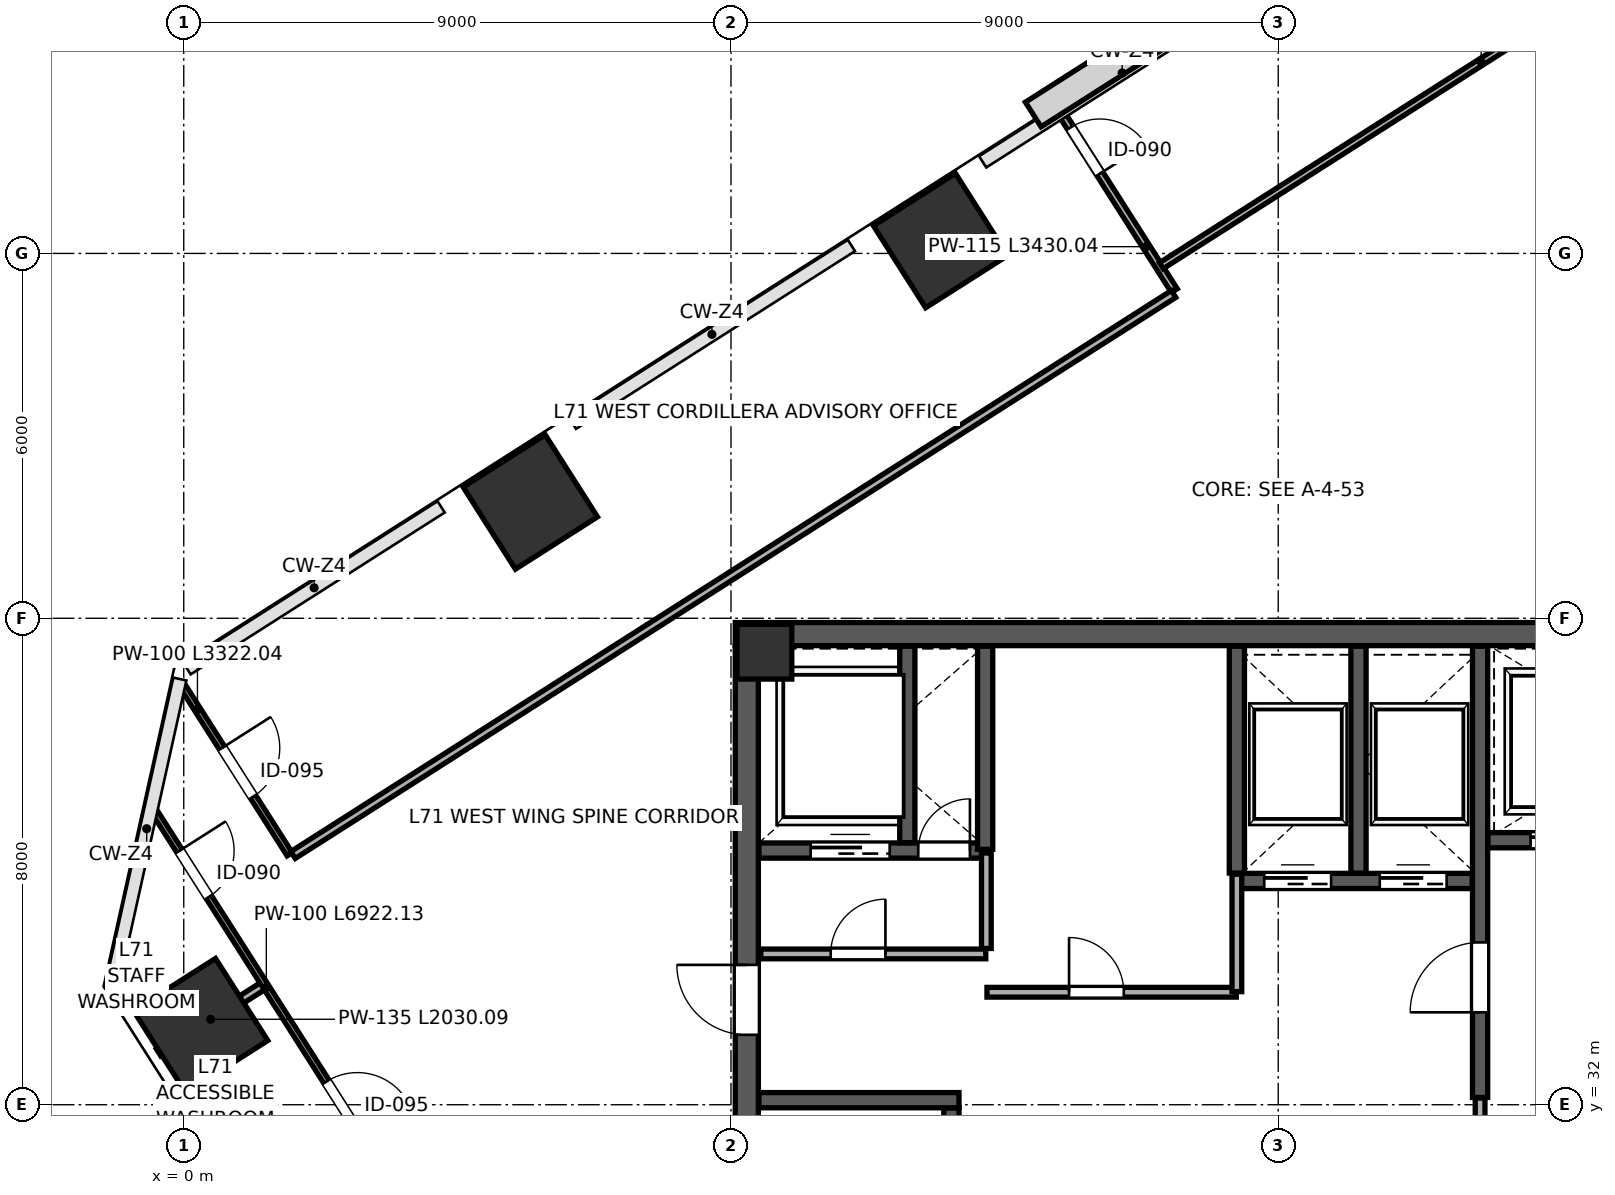
"""IFC4 building model, lengths in metres.
Left out: names, types, materials, properties, quantities, classifications, styles, units other than length and angle.
Written with IfcOpenShell. Run it as: python <this file> out.ifc"""

import sys

from ifc_helpers import new_model, si_unit, direction, frame, frame_2d, origin, origin_2d, place, context, subcontext, project, spatial, rectangle, extrude, source, transform, mapped, element, fill, save


model = new_model("IFC4")
c1 = context("Model", 3, precision=1e-05, world=origin(), true_north=direction((0.0, 1.0)))
c2 = subcontext(c1, "Body", "Model", "MODEL_VIEW")
j1 = project(units=[si_unit("LENGTHUNIT", "METRE"), si_unit("PLANEANGLEUNIT", "RADIAN")], contexts=[c1])
p1 = place(None, origin())
s1 = spatial("IfcSite", under=j1, at=p1, CompositionType="ELEMENT")
p2 = place(p1, origin())
s2 = spatial("IfcBuilding", under=s1, at=p2, CompositionType="ELEMENT")
p3 = place(p2, frame((0.0, 0.0, 315.6)))
s3 = spatial("IfcBuildingStorey", under=s2, at=p3, CompositionType="ELEMENT", Elevation=315.6)
m1 = source(origin(), c2, "Body", "SweptSolid", [
    extrude(rectangle(XDim=0.9, YDim=0.9, at=origin_2d()), origin(), (0.0, 0.0, 1.0), 4.198),
])
p4 = place(p3, frame((9.55, 39.45, 0.001), z_axis=(0.0, 0.0, 1.0), x_axis=(1.0, 0.0, 0.0)))
e1 = element("IfcColumn", 1, at=p4, inside=s3, PredefinedType="COLUMN", context=c2, shape_type="MappedRepresentation", body=[
    mapped(m1, transform((0.0, 0.0, 0.0), scale=1.0)),
])
m2 = source(origin(), c2, "Body", "SweptSolid", [
    extrude(rectangle(XDim=1.6, YDim=1.6, at=origin_2d()), origin(), (0.0, 0.0, 1.0), 4.198),
])
for number, where, z_axis, x_axis in (
    (2, (0.277, 33.301, 0.001), (0.0, 0.0, 1.0), (-0.537, 0.843, 0.0)),
    (3, (5.699, 41.913, 0.001), (0.0, 0.0, 1.0), (-0.537, 0.843, 0.0)),
    (4, (12.447, 46.211, 0.001), (0.0, 0.0, 1.0), (-0.537, 0.843, 0.0)),
):
    element("IfcColumn", number, at=place(p3, frame(where, z_axis=z_axis, x_axis=x_axis)), inside=s3, PredefinedType="COLUMN", context=c2, shape_type="MappedRepresentation", body=[
        mapped(m2, transform((0.0, 0.0, 0.0), scale=1.0)),
    ])
p5 = place(p3, frame((9.26, 24.45, 0.0), z_axis=(0.0, 0.0, 1.0), x_axis=(0.0, 1.0, 0.0)))
e5 = element("IfcWall", 5, at=p5, inside=s3, PredefinedType="SHEAR", context=c2, shape_type="SweptSolid", body=[
    extrude(rectangle(XDim=15.1, YDim=0.38, at=frame_2d((7.55, 0.0))), origin(), (0.0, 0.0, 1.0), 3.96),
])
p6 = place(p5, frame((8.7, 0.0, 0.0)))
e6 = element("IfcOpeningElement", 6, at=p6, cuts=e5, PredefinedType="OPENING", context=c2, shape_type="SweptSolid", body=[
    extrude(rectangle(XDim=1.15, YDim=2.2, at=frame_2d((0.575, 1.1))), frame((0.0, 0.2, 0.0), z_axis=(0.0, -1.0, 0.0), x_axis=(1.0, 0.0, 0.0)), (0.0, 0.0, 1.0), 0.4),
])
p7 = place(p3, frame((9.07, 39.74, 0.0), z_axis=(0.0, 0.0, 1.0), x_axis=(1.0, 0.0, 0.0)))
e7 = element("IfcWall", 7, at=p7, inside=s3, PredefinedType="SHEAR", context=c2, shape_type="SweptSolid", body=[
    extrude(rectangle(XDim=17.86, YDim=0.38, at=frame_2d((8.93, 0.0))), origin(), (0.0, 0.0, 1.0), 3.96),
])
p8 = place(p3, frame((12.625, 24.46, 0.0), z_axis=(0.0, 0.0, 1.0), x_axis=(0.0, 1.0, 0.0)))
e8 = element("IfcWall", 8, at=p8, inside=s3, PredefinedType="SHEAR", context=c2, shape_type="SweptSolid", body=[
    extrude(rectangle(XDim=7.49, YDim=0.25, at=frame_2d((3.745, 0.0))), origin(), (0.0, 0.0, 1.0), 3.96),
])
p9 = place(p8, frame((5.85, 0.0, 0.0)))
e9 = element("IfcOpeningElement", 9, at=p9, cuts=e8, PredefinedType="OPENING", context=c2, shape_type="SweptSolid", body=[
    extrude(rectangle(XDim=1.15, YDim=2.2, at=frame_2d((0.575, 1.1))), frame((0.0, 0.135, 0.0), z_axis=(0.0, -1.0, 0.0), x_axis=(1.0, 0.0, 0.0)), (0.0, 0.0, 1.0), 0.27),
])
p10 = place(p3, frame((9.46, 32.075, 0.0), z_axis=(0.0, 0.0, 1.0), x_axis=(1.0, 0.0, 0.0)))
e10 = element("IfcWall", 10, at=p10, inside=s3, PredefinedType="SHEAR", context=c2, shape_type="SweptSolid", body=[
    extrude(rectangle(XDim=3.29, YDim=0.25, at=frame_2d((1.645, 0.0))), origin(), (0.0, 0.0, 1.0), 3.96),
])
p11 = place(p3, frame((21.32, 32.12, 0.0), z_axis=(0.0, 0.0, 1.0), x_axis=(0.0, 1.0, 0.0)))
e11 = element("IfcWall", 11, at=p11, inside=s3, PredefinedType="SHEAR", context=c2, shape_type="SweptSolid", body=[
    extrude(rectangle(XDim=7.42, YDim=0.25, at=frame_2d((3.71, 0.0))), origin(), (0.0, 0.0, 1.0), 3.96),
])
p12 = place(p11, frame((1.4, 0.0, 0.0)))
e12 = element("IfcOpeningElement", 12, at=p12, cuts=e11, PredefinedType="OPENING", context=c2, shape_type="SweptSolid", body=[
    extrude(rectangle(XDim=1.15, YDim=2.2, at=frame_2d((0.575, 1.1))), frame((0.0, 0.135, 0.0), z_axis=(0.0, -1.0, 0.0), x_axis=(1.0, 0.0, 0.0)), (0.0, 0.0, 1.0), 0.27),
])
p13 = place(p3, frame((9.46, 36.18, 0.0), z_axis=(0.0, 0.0, 1.0), x_axis=(1.0, 0.0, 0.0)))
e13 = element("IfcWall", 13, at=p13, inside=s3, PredefinedType="SHEAR", context=c2, shape_type="SweptSolid", body=[
    extrude(rectangle(XDim=3.79, YDim=0.25, at=frame_2d((1.895, 0.0))), origin(), (0.0, 0.0, 1.0), 3.96),
])
p14 = place(p13, frame((2.62, 0.0, 0.0)))
e14 = element("IfcOpeningElement", 14, at=p14, cuts=e13, PredefinedType="OPENING", context=c2, shape_type="SweptSolid", body=[
    extrude(rectangle(XDim=0.85, YDim=2.1, at=frame_2d((0.425, 1.05))), frame((0.0, 0.135, 0.0), z_axis=(0.0, -1.0, 0.0), x_axis=(1.0, 0.0, 0.0)), (0.0, 0.0, 1.0), 0.27),
])
p15 = place(p13, frame((0.85, 0.0, 0.0)))
e15 = element("IfcOpeningElement", 15, at=p15, cuts=e13, PredefinedType="OPENING", context=c2, shape_type="SweptSolid", body=[
    extrude(rectangle(XDim=1.3, YDim=2.25, at=frame_2d((0.65, 1.125))), frame((0.0, 0.135, 0.0), z_axis=(0.0, -1.0, 0.0), x_axis=(1.0, 0.0, 0.0)), (0.0, 0.0, 1.0), 0.27),
])
p16 = place(p3, frame((11.9, 36.31, 0.0), z_axis=(0.0, 0.0, 1.0), x_axis=(0.0, 1.0, 0.0)))
e16 = element("IfcWall", 16, at=p16, inside=s3, PredefinedType="SHEAR", context=c2, shape_type="SweptSolid", body=[
    extrude(rectangle(XDim=3.23, YDim=0.25, at=frame_2d((1.615, 0.0))), origin(), (0.0, 0.0, 1.0), 3.96),
])
p17 = place(p3, frame((21.45, 36.35, 0.0), z_axis=(0.0, 0.0, 1.0), x_axis=(1.0, 0.0, 0.0)))
e17 = element("IfcWall", 17, at=p17, inside=s3, PredefinedType="SHEAR", context=c2, shape_type="SweptSolid", body=[
    extrude(rectangle(XDim=5.09, YDim=0.25, at=frame_2d((2.545, 0.0))), origin(), (0.0, 0.0, 1.0), 3.96),
])
p18 = place(p17, frame((0.7, 0.0, 0.0)))
e18 = element("IfcOpeningElement", 18, at=p18, cuts=e17, PredefinedType="OPENING", context=c2, shape_type="SweptSolid", body=[
    extrude(rectangle(XDim=1.2, YDim=2.2, at=frame_2d((0.6, 1.1))), frame((0.0, 0.135, 0.0), z_axis=(0.0, -1.0, 0.0), x_axis=(1.0, 0.0, 0.0)), (0.0, 0.0, 1.0), 0.27),
])
p19 = place(p17, frame((3.25, 0.0, 0.0)))
e19 = element("IfcOpeningElement", 19, at=p19, cuts=e17, PredefinedType="OPENING", context=c2, shape_type="SweptSolid", body=[
    extrude(rectangle(XDim=1.2, YDim=2.2, at=frame_2d((0.6, 1.1))), frame((0.0, 0.135, 0.0), z_axis=(0.0, -1.0, 0.0), x_axis=(1.0, 0.0, 0.0)), (0.0, 0.0, 1.0), 0.27),
])
p20 = place(p3, frame((13.18, 36.2, 0.0), z_axis=(0.0, 0.0, 1.0), x_axis=(0.0, 1.0, 0.0)))
e20 = element("IfcWall", 20, at=p20, inside=s3, PredefinedType="SHEAR", context=c2, shape_type="SweptSolid", body=[
    extrude(rectangle(XDim=3.34, YDim=0.25, at=frame_2d((1.67, 0.0))), origin(), (0.0, 0.0, 1.0), 3.96),
])
p21 = place(p3, frame((17.32, 35.68, 0.0), z_axis=(0.0, 0.0, 1.0), x_axis=(1.0, 0.0, 0.0)))
e21 = element("IfcWall", 21, at=p21, inside=s3, PredefinedType="SHEAR", context=c2, shape_type="SweptSolid", body=[
    extrude(rectangle(XDim=3.87, YDim=0.25, at=frame_2d((1.935, 0.0))), origin(), (0.0, 0.0, 1.0), 3.96),
])
p22 = place(p21, frame((0.45, 0.0, 0.0)))
e22 = element("IfcOpeningElement", 22, at=p22, cuts=e21, PredefinedType="OPENING", context=c2, shape_type="SweptSolid", body=[
    extrude(rectangle(XDim=1.1, YDim=2.2, at=frame_2d((0.55, 1.1))), frame((0.0, 0.135, 0.0), z_axis=(0.0, -1.0, 0.0), x_axis=(1.0, 0.0, 0.0)), (0.0, 0.0, 1.0), 0.27),
])
p23 = place(p21, frame((2.35, 0.0, 0.0)))
e23 = element("IfcOpeningElement", 23, at=p23, cuts=e21, PredefinedType="OPENING", context=c2, shape_type="SweptSolid", body=[
    extrude(rectangle(XDim=1.1, YDim=2.2, at=frame_2d((0.55, 1.1))), frame((0.0, 0.135, 0.0), z_axis=(0.0, -1.0, 0.0), x_axis=(1.0, 0.0, 0.0)), (0.0, 0.0, 1.0), 0.27),
])
for number, where, z_axis, x_axis in (
    (24, (17.32, 35.81, 0.0), (0.0, 0.0, 1.0), (0.0, 1.0, 0.0)),
    (25, (19.32, 35.81, 0.0), (0.0, 0.0, 1.0), (0.0, 1.0, 0.0)),
):
    element("IfcWall", number, at=place(p3, frame(where, z_axis=z_axis, x_axis=x_axis)), inside=s3, PredefinedType="SHEAR", context=c2, shape_type="SweptSolid", body=[
        extrude(rectangle(XDim=3.73, YDim=0.25, at=frame_2d((1.865, 0.0))), origin(), (0.0, 0.0, 1.0), 3.96),
    ])
p24 = place(p3, frame((9.49, 34.48, 0.0), z_axis=(0.0, 0.0, 1.0), x_axis=(1.0, 0.0, 0.0)))
e26 = element("IfcWall", 26, at=p24, inside=s3, PredefinedType="PARTITIONING", context=c2, shape_type="SweptSolid", body=[
    extrude(rectangle(XDim=3.7, YDim=0.16, at=frame_2d((1.85, 0.0))), origin(), (0.0, 0.0, 1.0), 3.96),
])
p25 = place(p24, frame((1.15, 0.0, 0.0)))
e27 = element("IfcOpeningElement", 27, at=p25, cuts=e26, PredefinedType="OPENING", context=c2, shape_type="SweptSolid", body=[
    extrude(rectangle(XDim=0.9, YDim=2.15, at=frame_2d((0.45, 1.075))), frame((0.0, 0.09, 0.0), z_axis=(0.0, -1.0, 0.0), x_axis=(1.0, 0.0, 0.0)), (0.0, 0.0, 1.0), 0.18),
])
p26 = place(p3, frame((13.2, 34.57, 0.0), z_axis=(0.0, 0.0, 1.0), x_axis=(0.0, 1.0, 0.0)))
e28 = element("IfcWall", 28, at=p26, inside=s3, PredefinedType="PARTITIONING", context=c2, shape_type="SweptSolid", body=[
    extrude(rectangle(XDim=1.57, YDim=0.16, at=frame_2d((0.785, 0.0))), origin(), (0.0, 0.0, 1.0), 3.96),
])
p27 = place(p3, frame((13.21, 33.85, 0.0), z_axis=(0.0, 0.0, 1.0), x_axis=(1.0, 0.0, 0.0)))
e29 = element("IfcWall", 29, at=p27, inside=s3, PredefinedType="PARTITIONING", context=c2, shape_type="SweptSolid", body=[
    extrude(rectangle(XDim=4.1, YDim=0.16, at=frame_2d((2.05, 0.0))), origin(), (0.0, 0.0, 1.0), 3.96),
])
p28 = place(p27, frame((1.35, 0.0, 0.0)))
e30 = element("IfcOpeningElement", 30, at=p28, cuts=e29, PredefinedType="OPENING", context=c2, shape_type="SweptSolid", body=[
    extrude(rectangle(XDim=0.9, YDim=2.15, at=frame_2d((0.45, 1.075))), frame((0.0, 0.09, 0.0), z_axis=(0.0, -1.0, 0.0), x_axis=(1.0, 0.0, 0.0)), (0.0, 0.0, 1.0), 0.18),
])
p29 = place(p3, frame((17.32, 33.86, 0.0), z_axis=(0.0, 0.0, 1.0), x_axis=(0.0, 1.0, 0.0)))
e31 = element("IfcWall", 31, at=p29, inside=s3, PredefinedType="PARTITIONING", context=c2, shape_type="SweptSolid", body=[
    extrude(rectangle(XDim=1.93, YDim=0.16, at=frame_2d((0.965, 0.0))), origin(), (0.0, 0.0, 1.0), 3.96),
])
p30 = place(p3, frame((21.32, 29.19, 0.0), z_axis=(0.0, 0.0, 1.0), x_axis=(0.0, 1.0, 0.0)))
e32 = element("IfcWall", 32, at=p30, inside=s3, PredefinedType="PARTITIONING", context=c2, shape_type="SweptSolid", body=[
    extrude(rectangle(XDim=2.92, YDim=0.16, at=frame_2d((1.46, 0.0))), origin(), (0.0, 0.0, 1.0), 3.96),
])
p31 = place(p3, frame((-0.414, 32.86, 0.0), z_axis=(0.0, 0.0, 1.0), x_axis=(0.843468317829, 0.5371789244, 0.0)))
e33 = element("IfcWall", 33, at=p31, inside=s3, PredefinedType="PARTITIONING", context=c2, shape_type="SweptSolid", body=[
    extrude(rectangle(XDim=2.03, YDim=0.135, at=frame_2d((1.015, 0.0))), origin(), (0.0, 0.0, 1.0), 3.295),
])
p32 = place(p3, frame((-0.502, 36.85, 0.0), z_axis=(0.0, 0.0, 1.0), x_axis=(0.537309039539, -0.843385437407, 0.0)))
e34 = element("IfcWall", 34, at=p32, inside=s3, PredefinedType="PARTITIONING", context=c2, shape_type="SweptSolid", body=[
    extrude(rectangle(XDim=6.922, YDim=0.1, at=frame_2d((3.461, 0.0))), origin(), (0.0, 0.0, 1.0), 3.96),
])
p33 = place(p32, frame((0.8, 0.0, 0.0)))
e35 = element("IfcOpeningElement", 35, at=p33, cuts=e34, PredefinedType="OPENING", context=c2, shape_type="SweptSolid", body=[
    extrude(rectangle(XDim=0.9, YDim=2.15, at=frame_2d((0.45, 1.075))), frame((0.0, 0.06, 0.0), z_axis=(0.0, -1.0, 0.0), x_axis=(1.0, 0.0, 0.0)), (0.0, 0.0, 1.0), 0.12),
])
p34 = place(p32, frame((5.3, 0.0, 0.0)))
e36 = element("IfcOpeningElement", 36, at=p34, cuts=e34, PredefinedType="OPENING", context=c2, shape_type="SweptSolid", body=[
    extrude(rectangle(XDim=0.95, YDim=2.15, at=frame_2d((0.475, 1.075))), frame((0.0, 0.06, 0.0), z_axis=(0.0, -1.0, 0.0), x_axis=(1.0, 0.0, 0.0)), (0.0, 0.0, 1.0), 0.12),
])
p35 = place(p3, frame((14.448, 48.281, 0.0), z_axis=(0.0, 0.0, 1.0), x_axis=(0.537285301829, -0.843400559899, 0.0)))
e37 = element("IfcWall", 37, at=p35, inside=s3, PredefinedType="PARTITIONING", context=c2, shape_type="SweptSolid", body=[
    extrude(rectangle(XDim=3.43, YDim=0.115, at=frame_2d((1.715, 0.0))), origin(), (0.0, 0.0, 1.0), 3.295),
])
p36 = place(p35, frame((0.25, 0.0, 0.0)))
e38 = element("IfcOpeningElement", 38, at=p36, cuts=e37, PredefinedType="OPENING", context=c2, shape_type="SweptSolid", body=[
    extrude(rectangle(XDim=0.9, YDim=2.15, at=frame_2d((0.45, 1.075))), frame((0.0, 0.067, 0.0), z_axis=(0.0, -1.0, 0.0), x_axis=(1.0, 0.0, 0.0)), (0.0, 0.0, 1.0), 0.135),
])
p37 = place(p3, frame((-0.042, 38.921, 0.0), z_axis=(0.0, 0.0, 1.0), x_axis=(0.537298651026, -0.843392055693, 0.0)))
e39 = element("IfcWall", 39, at=p37, inside=s3, PredefinedType="PARTITIONING", context=c2, shape_type="SweptSolid", body=[
    extrude(rectangle(XDim=3.322, YDim=0.1, at=frame_2d((1.661, 0.0))), origin(), (0.0, 0.0, 1.0), 3.96),
])
p38 = place(p37, frame((1.25, 0.0, 0.0)))
e40 = element("IfcOpeningElement", 40, at=p38, cuts=e39, PredefinedType="OPENING", context=c2, shape_type="SweptSolid", body=[
    extrude(rectangle(XDim=0.95, YDim=2.15, at=frame_2d((0.475, 1.075))), frame((0.0, 0.06, 0.0), z_axis=(0.0, -1.0, 0.0), x_axis=(1.0, 0.0, 0.0)), (0.0, 0.0, 1.0), 0.12),
])
p39 = place(p3, frame((1.798, 36.107, 0.0), z_axis=(0.0, 0.0, 1.0), x_axis=(0.843396745572, 0.537291289301, 0.0)))
e41 = element("IfcWall", 41, at=p39, inside=s3, PredefinedType="PARTITIONING", context=c2, shape_type="SweptSolid", body=[
    extrude(rectangle(XDim=17.17, YDim=0.135, at=frame_2d((8.585, 0.0))), origin(), (0.0, 0.0, 1.0), 3.96),
])
p40 = place(p3, frame((16.077, 45.797, 0.0), z_axis=(0.0, 0.0, 1.0), x_axis=(0.843392973199, 0.537297210824, 0.0)))
e42 = element("IfcWall", 42, at=p40, inside=s3, PredefinedType="PARTITIONING", context=c2, shape_type="SweptSolid", body=[
    extrude(rectangle(XDim=12.472, YDim=0.115, at=frame_2d((6.236, 0.0))), origin(), (0.0, 0.0, 1.0), 3.96),
])
m3 = source(origin(), c2, "Body", "SweptSolid", [
    extrude(rectangle(XDim=1.15, YDim=2.2, at=frame_2d((0.575, 1.1))), frame((0.0, 0.025, 0.0), z_axis=(0.0, -1.0, 0.0), x_axis=(1.0, 0.0, 0.0)), (0.0, 0.0, 1.0), 0.05),
])
p41 = place(p12, origin())
e43 = element("IfcDoor", 43, at=p41, inside=s3, OperationType="SINGLE_SWING_LEFT", PredefinedType="DOOR", context=c2, shape_type="MappedRepresentation", body=[
    mapped(m3, transform((0.0, 0.0, 0.0), scale=1.0)),
])
fill(e12, e43)
p42 = place(p6, origin())
e44 = element("IfcDoor", 44, at=p42, inside=s3, OperationType="SINGLE_SWING_RIGHT", PredefinedType="DOOR", context=c2, shape_type="MappedRepresentation", body=[
    mapped(m3, transform((0.0, 0.0, 0.0), scale=1.0)),
])
fill(e6, e44)
m4 = source(origin(), c2, "Body", "SweptSolid", [
    extrude(rectangle(XDim=0.85, YDim=2.1, at=frame_2d((0.425, 1.05))), frame((0.0, 0.025, 0.0), z_axis=(0.0, -1.0, 0.0), x_axis=(1.0, 0.0, 0.0)), (0.0, 0.0, 1.0), 0.05),
])
p43 = place(p14, origin())
e45 = element("IfcDoor", 45, at=p43, inside=s3, OperationType="SINGLE_SWING_RIGHT", PredefinedType="DOOR", context=c2, shape_type="MappedRepresentation", body=[
    mapped(m4, transform((0.0, 0.0, 0.0), scale=1.0)),
])
fill(e14, e45)
m5 = source(origin(), c2, "Body", "SweptSolid", [
    extrude(rectangle(XDim=1.1, YDim=2.2, at=frame_2d((0.55, 1.1))), frame((0.0, 0.025, 0.0), z_axis=(0.0, -1.0, 0.0), x_axis=(1.0, 0.0, 0.0)), (0.0, 0.0, 1.0), 0.05),
])
p44 = place(p22, origin())
e46 = element("IfcDoor", 46, at=p44, inside=s3, OperationType="SLIDING_TO_LEFT", PredefinedType="DOOR", context=c2, shape_type="MappedRepresentation", body=[
    mapped(m5, transform((0.0, 0.0, 0.0), scale=1.0)),
])
fill(e22, e46)
p45 = place(p23, origin())
e47 = element("IfcDoor", 47, at=p45, inside=s3, OperationType="SLIDING_TO_RIGHT", PredefinedType="DOOR", context=c2, shape_type="MappedRepresentation", body=[
    mapped(m5, transform((0.0, 0.0, 0.0), scale=1.0)),
])
fill(e23, e47)
m6 = source(origin(), c2, "Body", "SweptSolid", [
    extrude(rectangle(XDim=1.2, YDim=2.2, at=frame_2d((0.6, 1.1))), frame((0.0, 0.025, 0.0), z_axis=(0.0, -1.0, 0.0), x_axis=(1.0, 0.0, 0.0)), (0.0, 0.0, 1.0), 0.05),
])
p46 = place(p18, origin())
e48 = element("IfcDoor", 48, at=p46, inside=s3, OperationType="SLIDING_TO_LEFT", PredefinedType="DOOR", context=c2, shape_type="MappedRepresentation", body=[
    mapped(m6, transform((0.0, 0.0, 0.0), scale=1.0)),
])
fill(e18, e48)
m7 = source(origin(), c2, "Body", "SweptSolid", [
    extrude(rectangle(XDim=1.3, YDim=2.25, at=frame_2d((0.65, 1.125))), frame((0.0, 0.025, 0.0), z_axis=(0.0, -1.0, 0.0), x_axis=(1.0, 0.0, 0.0)), (0.0, 0.0, 1.0), 0.05),
])
p47 = place(p15, origin())
e49 = element("IfcDoor", 49, at=p47, inside=s3, OperationType="SLIDING_TO_LEFT", PredefinedType="DOOR", context=c2, shape_type="MappedRepresentation", body=[
    mapped(m7, transform((0.0, 0.0, 0.0), scale=1.0)),
])
fill(e15, e49)
m8 = source(origin(), c2, "Body", "SweptSolid", [
    extrude(rectangle(XDim=0.9, YDim=2.15, at=frame_2d((0.45, 1.075))), frame((0.0, 0.025, 0.0), z_axis=(0.0, -1.0, 0.0), x_axis=(1.0, 0.0, 0.0)), (0.0, 0.0, 1.0), 0.05),
])
p48 = place(p25, origin())
e50 = element("IfcDoor", 50, at=p48, inside=s3, OperationType="SINGLE_SWING_RIGHT", PredefinedType="DOOR", context=c2, shape_type="MappedRepresentation", body=[
    mapped(m8, transform((0.0, 0.0, 0.0), scale=1.0)),
])
fill(e27, e50)
p49 = place(p28, origin())
e51 = element("IfcDoor", 51, at=p49, inside=s3, OperationType="SINGLE_SWING_LEFT", PredefinedType="DOOR", context=c2, shape_type="MappedRepresentation", body=[
    mapped(m8, transform((0.0, 0.0, 0.0), scale=1.0)),
])
fill(e30, e51)
m9 = source(origin(), c2, "Body", "SweptSolid", [
    extrude(rectangle(XDim=0.9, YDim=2.15, at=frame_2d((0.45, 1.075))), frame((0.0, 0.025, 0.0), z_axis=(0.0, -1.0, 0.0), x_axis=(1.0, 0.0, 0.0)), (0.0, 0.0, 1.0), 0.05),
])
p50 = place(p33, origin())
e52 = element("IfcDoor", 52, at=p50, inside=s3, OperationType="SINGLE_SWING_LEFT", PredefinedType="DOOR", context=c2, shape_type="MappedRepresentation", body=[
    mapped(m9, transform((0.0, 0.0, 0.0), scale=1.0)),
])
fill(e35, e52)
m10 = source(origin(), c2, "Body", "SweptSolid", [
    extrude(rectangle(XDim=0.95, YDim=2.15, at=frame_2d((0.475, 1.075))), frame((0.0, 0.025, 0.0), z_axis=(0.0, -1.0, 0.0), x_axis=(1.0, 0.0, 0.0)), (0.0, 0.0, 1.0), 0.05),
])
p51 = place(p34, origin())
e53 = element("IfcDoor", 53, at=p51, inside=s3, OperationType="SINGLE_SWING_RIGHT", PredefinedType="DOOR", context=c2, shape_type="MappedRepresentation", body=[
    mapped(m10, transform((0.0, 0.0, 0.0), scale=1.0)),
])
fill(e36, e53)
p52 = place(p38, origin())
e54 = element("IfcDoor", 54, at=p52, inside=s3, OperationType="SINGLE_SWING_LEFT", PredefinedType="DOOR", context=c2, shape_type="MappedRepresentation", body=[
    mapped(m10, transform((0.0, 0.0, 0.0), scale=1.0)),
])
fill(e40, e54)
p53 = place(p36, origin())
e55 = element("IfcDoor", 55, at=p53, inside=s3, OperationType="SINGLE_SWING_RIGHT", PredefinedType="DOOR", context=c2, shape_type="MappedRepresentation", body=[
    mapped(m9, transform((0.0, 0.0, 0.0), scale=1.0)),
])
fill(e38, e55)
save(model, sys.argv[1])
